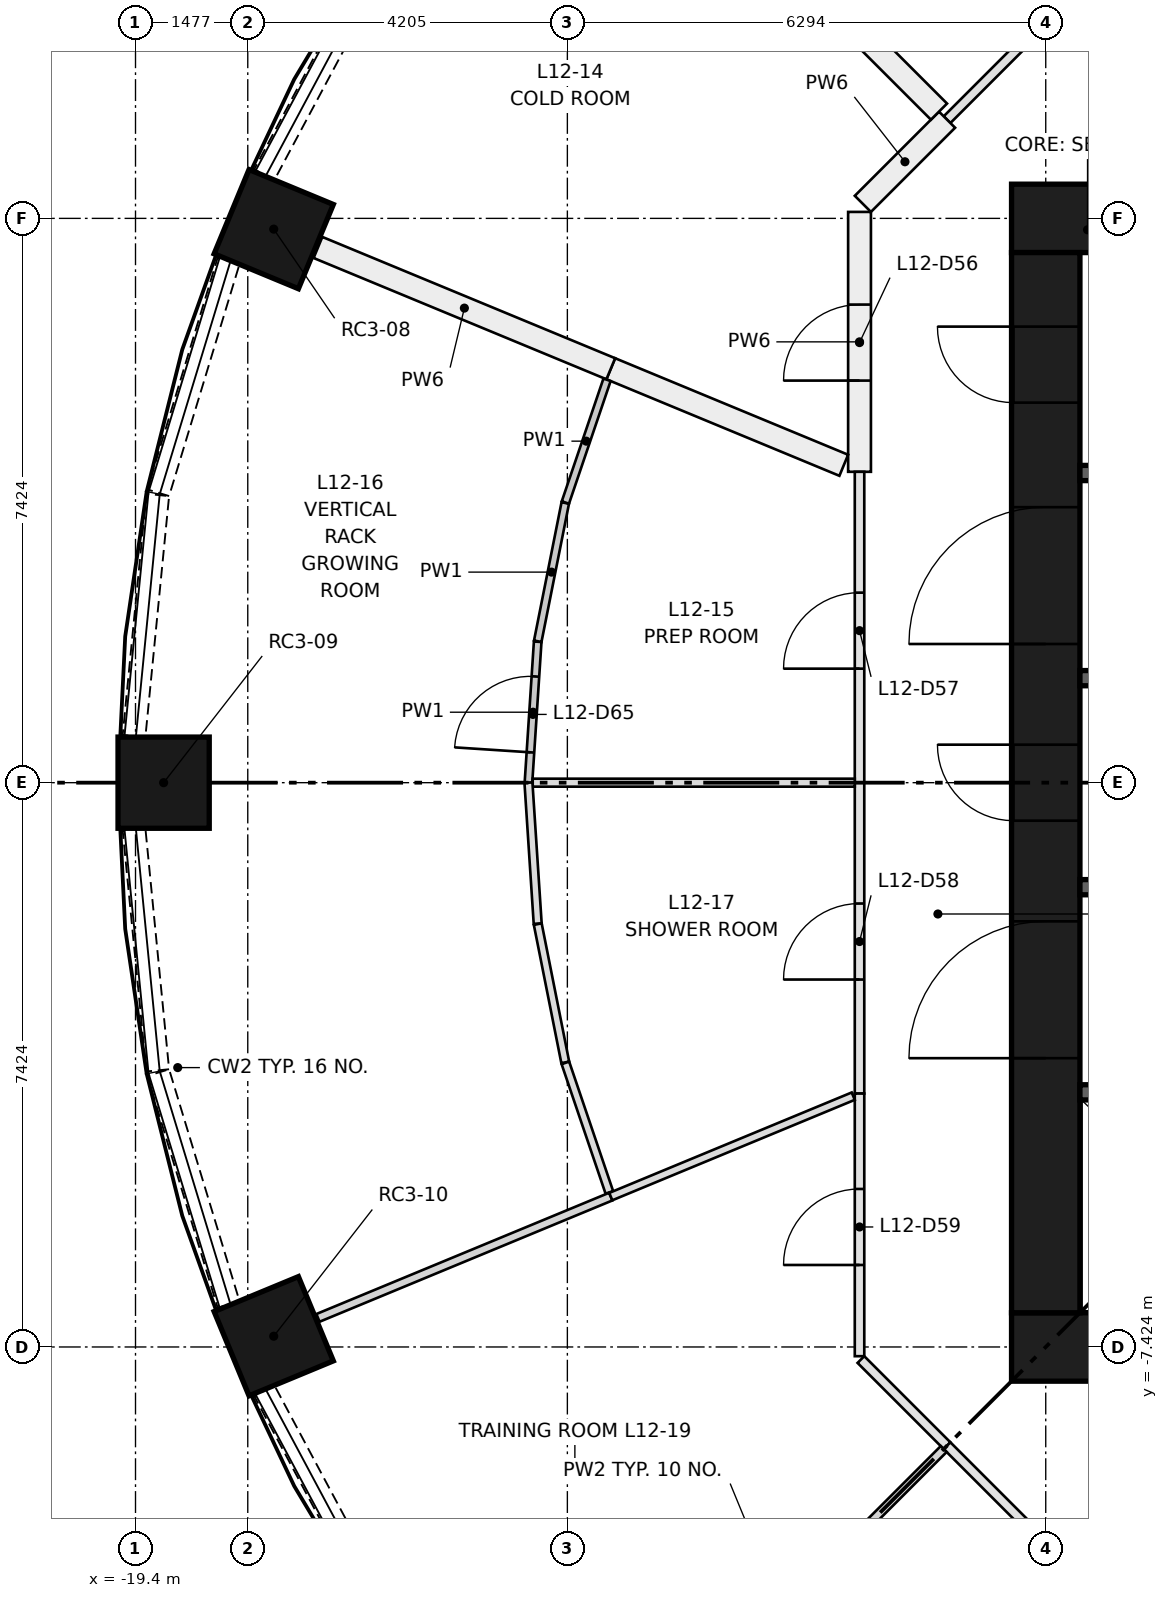
"""IFC4 building model, lengths in metres.
Left out: names, types, materials, properties, quantities, classifications, styles, units other than length and angle.
Written with IfcOpenShell. Run it as: python <this file> out.ifc"""

import sys

from ifc_helpers import new_model, si_unit, direction, frame, frame_2d, origin, origin_2d, place, context, subcontext, project, spatial, rectangle, extrude, element, fill, save


model = new_model("IFC4")
c1 = context("Model", 3, precision=1e-05, world=origin(), true_north=direction((0.0, 1.0)))
c2 = subcontext(c1, "Body", "Model", "MODEL_VIEW")
j1 = project(units=[si_unit("LENGTHUNIT", "METRE"), si_unit("PLANEANGLEUNIT", "RADIAN")], contexts=[c1])
p1 = place(None, origin())
s1 = spatial("IfcSite", under=j1, at=p1, CompositionType="ELEMENT")
p2 = place(p1, origin())
s2 = spatial("IfcBuilding", under=s1, at=p2, CompositionType="ELEMENT")
p3 = place(p2, frame((0.0, 0.0, 48.1)))
s3 = spatial("IfcBuildingStorey", under=s2, at=p3, CompositionType="ELEMENT", Elevation=48.1)
for number, where, z_axis, x_axis in (
    (1, (-17.582, 7.282, 0.0), (0.0, 0.0, 1.0), (-0.924, 0.383, 0.0)),
    (2, (-19.03, 0.0, 0.0), (0.0, 0.0, 1.0), (-1.0, 0.0, 0.0)),
    (3, (-17.582, -7.282, 0.0), (0.0, 0.0, 1.0), (-0.924, -0.383, 0.0)),
):
    element("IfcColumn", number, at=place(p3, frame(where, z_axis=z_axis, x_axis=x_axis)), inside=s3, PredefinedType="COLUMN", context=c2, shape_type="SweptSolid", body=[
        extrude(rectangle(XDim=1.2, YDim=1.2, at=origin_2d()), origin(), (0.0, 0.0, 1.0), 3.65),
    ])
for number, where, z_axis, x_axis in (
    (4, (-7.874, -7.424, 0.0), (0.0, 0.0, 1.0), (1.0, 0.0, 0.0)),
    (5, (-7.874, 7.424, 0.0), (0.0, 0.0, 1.0), (1.0, 0.0, 0.0)),
):
    element("IfcWall", number, at=place(p3, frame(where, z_axis=z_axis, x_axis=x_axis)), inside=s3, PredefinedType="SHEAR", context=c2, shape_type="SweptSolid", body=[
        extrude(rectangle(XDim=15.748, YDim=0.9, at=frame_2d((7.874, 0.0))), origin(), (0.0, 0.0, 1.0), 3.65),
    ])
p4 = place(p3, frame((-7.424, -6.974, 0.0), z_axis=(0.0, 0.0, 1.0), x_axis=(0.0, 1.0, 0.0)))
e6 = element("IfcWall", 6, at=p4, inside=s3, PredefinedType="SHEAR", context=c2, shape_type="SweptSolid", body=[
    extrude(rectangle(XDim=13.948, YDim=0.9, at=frame_2d((6.974, 0.0))), origin(), (0.0, 0.0, 1.0), 3.65),
])
p5 = place(p4, frame((6.474, 0.0, 0.0)))
e7 = element("IfcOpeningElement", 7, at=p5, cuts=e6, PredefinedType="OPENING", context=c2, shape_type="SweptSolid", body=[
    extrude(rectangle(XDim=1.0, YDim=2.1, at=frame_2d((0.5, 1.05))), frame((0.0, 0.46, 0.0), z_axis=(0.0, -1.0, 0.0), x_axis=(1.0, 0.0, 0.0)), (0.0, 0.0, 1.0), 0.92),
])
p6 = place(p4, frame((3.35, 0.0, 0.0)))
e8 = element("IfcOpeningElement", 8, at=p6, cuts=e6, PredefinedType="OPENING", context=c2, shape_type="SweptSolid", body=[
    extrude(rectangle(XDim=1.8, YDim=2.1, at=frame_2d((0.9, 1.05))), frame((0.0, 0.46, 0.0), z_axis=(0.0, -1.0, 0.0), x_axis=(1.0, 0.0, 0.0)), (0.0, 0.0, 1.0), 0.92),
])
p7 = place(p4, frame((8.799, 0.0, 0.0)))
e9 = element("IfcOpeningElement", 9, at=p7, cuts=e6, PredefinedType="OPENING", context=c2, shape_type="SweptSolid", body=[
    extrude(rectangle(XDim=1.8, YDim=2.1, at=frame_2d((0.9, 1.05))), frame((0.0, 0.46, 0.0), z_axis=(0.0, -1.0, 0.0), x_axis=(1.0, 0.0, 0.0)), (0.0, 0.0, 1.0), 0.92),
])
p8 = place(p4, frame((11.974, 0.0, 0.0)))
e10 = element("IfcOpeningElement", 10, at=p8, cuts=e6, PredefinedType="OPENING", context=c2, shape_type="SweptSolid", body=[
    extrude(rectangle(XDim=1.0, YDim=2.1, at=frame_2d((0.5, 1.05))), frame((0.0, 0.46, 0.0), z_axis=(0.0, -1.0, 0.0), x_axis=(1.0, 0.0, 0.0)), (0.0, 0.0, 1.0), 0.92),
])
p9 = place(p3, frame((-6.974, -4.074, 0.0), z_axis=(0.0, 0.0, 1.0), x_axis=(1.0, 0.0, 0.0)))
e11 = element("IfcWall", 11, at=p9, inside=s3, PredefinedType="SHEAR", context=c2, shape_type="SweptSolid", body=[
    extrude(rectangle(XDim=13.948, YDim=0.2, at=frame_2d((6.974, 0.0))), origin(), (0.0, 0.0, 1.0), 3.3),
])
p10 = place(p9, frame((0.918, 0.0, 0.0)))
e12 = element("IfcOpeningElement", 12, at=p10, cuts=e11, PredefinedType="OPENING", context=c2, shape_type="SweptSolid", body=[
    extrude(rectangle(XDim=1.1, YDim=2.1, at=frame_2d((0.55, 1.05))), frame((0.0, 0.11, 0.0), z_axis=(0.0, -1.0, 0.0), x_axis=(1.0, 0.0, 0.0)), (0.0, 0.0, 1.0), 0.22),
])
p11 = place(p9, frame((4.055, 0.0, 0.0)))
e13 = element("IfcOpeningElement", 13, at=p11, cuts=e11, PredefinedType="OPENING", context=c2, shape_type="SweptSolid", body=[
    extrude(rectangle(XDim=1.1, YDim=2.1, at=frame_2d((0.55, 1.05))), frame((0.0, 0.11, 0.0), z_axis=(0.0, -1.0, 0.0), x_axis=(1.0, 0.0, 0.0)), (0.0, 0.0, 1.0), 0.22),
])
p12 = place(p9, frame((6.658, 0.0, 0.0)))
e14 = element("IfcOpeningElement", 14, at=p12, cuts=e11, PredefinedType="OPENING", context=c2, shape_type="SweptSolid", body=[
    extrude(rectangle(XDim=1.0, YDim=2.1, at=frame_2d((0.5, 1.05))), frame((0.0, 0.11, 0.0), z_axis=(0.0, -1.0, 0.0), x_axis=(1.0, 0.0, 0.0)), (0.0, 0.0, 1.0), 0.22),
])
p13 = place(p9, frame((8.627, 0.0, 0.0)))
e15 = element("IfcOpeningElement", 15, at=p13, cuts=e11, PredefinedType="OPENING", context=c2, shape_type="SweptSolid", body=[
    extrude(rectangle(XDim=1.0, YDim=2.1, at=frame_2d((0.5, 1.05))), frame((0.0, 0.11, 0.0), z_axis=(0.0, -1.0, 0.0), x_axis=(1.0, 0.0, 0.0)), (0.0, 0.0, 1.0), 0.22),
])
p14 = place(p9, frame((10.595, 0.0, 0.0)))
e16 = element("IfcOpeningElement", 16, at=p14, cuts=e11, PredefinedType="OPENING", context=c2, shape_type="SweptSolid", body=[
    extrude(rectangle(XDim=1.0, YDim=2.1, at=frame_2d((0.5, 1.05))), frame((0.0, 0.11, 0.0), z_axis=(0.0, -1.0, 0.0), x_axis=(1.0, 0.0, 0.0)), (0.0, 0.0, 1.0), 0.22),
])
p15 = place(p9, frame((12.564, 0.0, 0.0)))
e17 = element("IfcOpeningElement", 17, at=p15, cuts=e11, PredefinedType="OPENING", context=c2, shape_type="SweptSolid", body=[
    extrude(rectangle(XDim=1.0, YDim=2.1, at=frame_2d((0.5, 1.05))), frame((0.0, 0.11, 0.0), z_axis=(0.0, -1.0, 0.0), x_axis=(1.0, 0.0, 0.0)), (0.0, 0.0, 1.0), 0.22),
])
p16 = place(p3, frame((-6.974, 4.074, 0.0), z_axis=(0.0, 0.0, 1.0), x_axis=(1.0, 0.0, 0.0)))
e18 = element("IfcWall", 18, at=p16, inside=s3, PredefinedType="SHEAR", context=c2, shape_type="SweptSolid", body=[
    extrude(rectangle(XDim=6.974, YDim=0.2, at=frame_2d((3.487, 0.0))), origin(), (0.0, 0.0, 1.0), 3.3),
])
for number, where, z_axis, x_axis in (
    (19, (-6.974, -1.375, 0.0), (0.0, 0.0, 1.0), (1.0, 0.0, 0.0)),
    (20, (-6.974, 1.375, 0.0), (0.0, 0.0, 1.0), (1.0, 0.0, 0.0)),
):
    element("IfcWall", number, at=place(p3, frame(where, z_axis=z_axis, x_axis=x_axis)), inside=s3, PredefinedType="SHEAR", context=c2, shape_type="SweptSolid", body=[
        extrude(rectangle(XDim=2.6, YDim=0.2, at=frame_2d((1.3, 0.0))), origin(), (0.0, 0.0, 1.0), 3.3),
    ])
p17 = place(p3, frame((-16.204, 10.809, 0.0), z_axis=(0.0, 0.0, 1.0), x_axis=(-0.471260138764, -0.881994263934, 0.0)))
e21 = element("IfcWall", 21, at=p17, inside=s3, PredefinedType="SOLIDWALL", context=c2, shape_type="SweptSolid", body=[
    extrude(rectangle(XDim=3.187, YDim=0.3, at=frame_2d((1.593, 0.0))), origin(), (0.0, 0.0, 1.0), 0.9),
])
p18 = place(p3, frame((-18.175, 6.865, 0.0), z_axis=(0.0, 0.0, 1.0), x_axis=(-0.290585541792, -0.956849017819, 0.0)))
e22 = element("IfcWall", 22, at=p18, inside=s3, PredefinedType="SOLIDWALL", context=c2, shape_type="SweptSolid", body=[
    extrude(rectangle(XDim=3.188, YDim=0.3, at=frame_2d((1.594, 0.0))), origin(), (0.0, 0.0, 1.0), 0.9),
])
for number, where, z_axis, x_axis in (
    (23, (-19.107, 3.785, 0.0), (0.0, 0.0, 1.0), (-0.098, -0.995, 0.0)),
    (24, (-19.419, -0.613, 0.0), (0.0, 0.0, 1.0), (0.098, -0.995, 0.0)),
):
    element("IfcWall", number, at=place(p3, frame(where, z_axis=z_axis, x_axis=x_axis)), inside=s3, PredefinedType="SOLIDWALL", context=c2, shape_type="SweptSolid", body=[
        extrude(rectangle(XDim=3.188, YDim=0.3, at=frame_2d((1.594, 0.0))), origin(), (0.0, 0.0, 1.0), 0.9),
    ])
p19 = place(p3, frame((-19.102, -3.814, 0.0), z_axis=(0.0, 0.0, 1.0), x_axis=(0.290585541792, -0.956849017819, 0.0)))
e25 = element("IfcWall", 25, at=p19, inside=s3, PredefinedType="SOLIDWALL", context=c2, shape_type="SweptSolid", body=[
    extrude(rectangle(XDim=3.188, YDim=0.3, at=frame_2d((1.594, 0.0))), origin(), (0.0, 0.0, 1.0), 0.9),
])
p20 = place(p3, frame((-17.706, -7.998, 0.0), z_axis=(0.0, 0.0, 1.0), x_axis=(0.471260138764, -0.881994263934, 0.0)))
e26 = element("IfcWall", 26, at=p20, inside=s3, PredefinedType="SOLIDWALL", context=c2, shape_type="SweptSolid", body=[
    extrude(rectangle(XDim=3.187, YDim=0.3, at=frame_2d((1.593, 0.0))), origin(), (0.0, 0.0, 1.0), 0.9),
])
p21 = place(p3, frame((-8.722, 8.722, 0.0), z_axis=(0.0, 0.0, 1.0), x_axis=(0.707030604857, 0.70718294931, 0.0)))
e27 = element("IfcWall", 27, at=p21, inside=s3, PredefinedType="PARTITIONING", context=c2, shape_type="SweptSolid", body=[
    extrude(rectangle(XDim=1.603, YDim=0.125, at=frame_2d((0.801, 0.0))), origin(), (0.0, 0.0, 1.0), 3.3),
])
p22 = place(p3, frame((-9.874, 4.09, 0.0), z_axis=(0.0, 0.0, 1.0), x_axis=(0.0, 1.0, 0.0)))
e28 = element("IfcWall", 28, at=p22, inside=s3, PredefinedType="PARTITIONING", context=c2, shape_type="SweptSolid", body=[
    extrude(rectangle(XDim=3.419, YDim=0.3, at=frame_2d((1.709, 0.0))), origin(), (0.0, 0.0, 1.0), 3.3),
])
p23 = place(p22, frame((1.2, 0.0, 0.0)))
e29 = element("IfcOpeningElement", 29, at=p23, cuts=e28, PredefinedType="OPENING", context=c2, shape_type="SweptSolid", body=[
    extrude(rectangle(XDim=1.0, YDim=2.1, at=frame_2d((0.5, 1.05))), frame((0.0, 0.16, 0.0), z_axis=(0.0, -1.0, 0.0), x_axis=(1.0, 0.0, 0.0)), (0.0, 0.0, 1.0), 0.32),
])
p24 = place(p3, frame((-9.83, 7.615, 0.0), z_axis=(0.0, 0.0, 1.0), x_axis=(0.70718471217, 0.707028841614, 0.0)))
e30 = element("IfcWall", 30, at=p24, inside=s3, PredefinedType="PARTITIONING", context=c2, shape_type="SweptSolid", body=[
    extrude(rectangle(XDim=1.566, YDim=0.3, at=frame_2d((0.783, 0.0))), origin(), (0.0, 0.0, 1.0), 3.3),
])
p25 = place(p3, frame((-9.874, 0.0, 0.0), z_axis=(0.0, 0.0, 1.0), x_axis=(0.0, 1.0, 0.0)))
e31 = element("IfcWall", 31, at=p25, inside=s3, PredefinedType="PARTITIONING", context=c2, shape_type="SweptSolid", body=[
    extrude(rectangle(XDim=4.09, YDim=0.125, at=frame_2d((2.045, 0.0))), origin(), (0.0, 0.0, 1.0), 3.3),
])
p26 = place(p25, frame((1.5, 0.0, 0.0)))
e32 = element("IfcOpeningElement", 32, at=p26, cuts=e31, PredefinedType="OPENING", context=c2, shape_type="SweptSolid", body=[
    extrude(rectangle(XDim=1.0, YDim=2.1, at=frame_2d((0.5, 1.05))), frame((0.0, 0.073, 0.0), z_axis=(0.0, -1.0, 0.0), x_axis=(1.0, 0.0, 0.0)), (0.0, 0.0, 1.0), 0.145),
])
p27 = place(p3, frame((-9.874, -4.09, 0.0), z_axis=(0.0, 0.0, 1.0), x_axis=(0.0, 1.0, 0.0)))
e33 = element("IfcWall", 33, at=p27, inside=s3, PredefinedType="PARTITIONING", context=c2, shape_type="SweptSolid", body=[
    extrude(rectangle(XDim=4.09, YDim=0.125, at=frame_2d((2.045, 0.0))), origin(), (0.0, 0.0, 1.0), 3.3),
])
p28 = place(p27, frame((1.5, 0.0, 0.0)))
e34 = element("IfcOpeningElement", 34, at=p28, cuts=e33, PredefinedType="OPENING", context=c2, shape_type="SweptSolid", body=[
    extrude(rectangle(XDim=1.0, YDim=2.1, at=frame_2d((0.5, 1.05))), frame((0.0, 0.073, 0.0), z_axis=(0.0, -1.0, 0.0), x_axis=(1.0, 0.0, 0.0)), (0.0, 0.0, 1.0), 0.145),
])
p29 = place(p3, frame((-9.874, -7.545, 0.0), z_axis=(0.0, 0.0, 1.0), x_axis=(0.0, 1.0, 0.0)))
e35 = element("IfcWall", 35, at=p29, inside=s3, PredefinedType="PARTITIONING", context=c2, shape_type="SweptSolid", body=[
    extrude(rectangle(XDim=3.455, YDim=0.125, at=frame_2d((1.728, 0.0))), origin(), (0.0, 0.0, 1.0), 3.3),
])
p30 = place(p29, frame((1.2, 0.0, 0.0)))
e36 = element("IfcOpeningElement", 36, at=p30, cuts=e35, PredefinedType="OPENING", context=c2, shape_type="SweptSolid", body=[
    extrude(rectangle(XDim=1.0, YDim=2.1, at=frame_2d((0.5, 1.05))), frame((0.0, 0.073, 0.0), z_axis=(0.0, -1.0, 0.0), x_axis=(1.0, 0.0, 0.0)), (0.0, 0.0, 1.0), 0.145),
])
for number, where, z_axis, x_axis in (
    (37, (-8.722, -8.722, 0.0), (0.0, 0.0, 1.0), (-0.707, 0.707, 0.0)),
    (38, (-7.589, -9.856, 0.0), (0.0, 0.0, 1.0), (-0.707, 0.707, 0.0)),
):
    element("IfcWall", number, at=place(p3, frame(where, z_axis=z_axis, x_axis=x_axis)), inside=s3, PredefinedType="PARTITIONING", context=c2, shape_type="SweptSolid", body=[
        extrude(rectangle(XDim=1.603, YDim=0.125, at=frame_2d((0.801, 0.0))), origin(), (0.0, 0.0, 1.0), 3.3),
    ])
p31 = place(p3, frame((-8.829, 8.829, 0.0), z_axis=(0.0, 0.0, 1.0), x_axis=(-0.707106781187, 0.707106781187, 0.0)))
e39 = element("IfcWall", 39, at=p31, inside=s3, PredefinedType="PARTITIONING", context=c2, shape_type="SweptSolid", body=[
    extrude(rectangle(XDim=5.914, YDim=0.3, at=frame_2d((2.957, 0.0))), origin(), (0.0, 0.0, 1.0), 3.3),
])
p32 = place(p3, frame((-10.081, 4.176, 0.0), z_axis=(0.0, 0.0, 1.0), x_axis=(-0.923876033225, 0.382691880281, 0.0)))
e40 = element("IfcWall", 40, at=p32, inside=s3, PredefinedType="PARTITIONING", context=c2, shape_type="SweptSolid", body=[
    extrude(rectangle(XDim=3.318, YDim=0.3, at=frame_2d((1.659, 0.0))), origin(), (0.0, 0.0, 1.0), 3.3),
])
p33 = place(p3, frame((-13.147, 5.446, 0.0), z_axis=(0.0, 0.0, 1.0), x_axis=(-0.923873410436, 0.382698212028, 0.0)))
e41 = element("IfcWall", 41, at=p33, inside=s3, PredefinedType="PARTITIONING", context=c2, shape_type="SweptSolid", body=[
    extrude(rectangle(XDim=4.17, YDim=0.3, at=frame_2d((2.085, 0.0))), origin(), (0.0, 0.0, 1.0), 3.3),
])
p34 = place(p3, frame((-14.23, 0.0, 0.0), z_axis=(0.0, 0.0, 1.0), x_axis=(0.065437532333, 0.997856667745, 0.0)))
e42 = element("IfcWall", 42, at=p34, inside=s3, PredefinedType="PARTITIONING", context=c2, shape_type="SweptSolid", body=[
    extrude(rectangle(XDim=1.858, YDim=0.1, at=frame_2d((0.929, 0.0))), origin(), (0.0, 0.0, 1.0), 3.3),
])
p35 = place(p34, frame((0.4, 0.0, 0.0)))
e43 = element("IfcOpeningElement", 43, at=p35, cuts=e42, PredefinedType="OPENING", context=c2, shape_type="SweptSolid", body=[
    extrude(rectangle(XDim=1.0, YDim=2.1, at=frame_2d((0.5, 1.05))), frame((0.0, 0.06, 0.0), z_axis=(0.0, -1.0, 0.0), x_axis=(1.0, 0.0, 0.0)), (0.0, 0.0, 1.0), 0.12),
])
p36 = place(p3, frame((-14.108, 1.861, 0.0), z_axis=(0.0, 0.0, 1.0), x_axis=(0.195204777565, 0.980762506836, 0.0)))
e44 = element("IfcWall", 44, at=p36, inside=s3, PredefinedType="PARTITIONING", context=c2, shape_type="SweptSolid", body=[
    extrude(rectangle(XDim=1.855, YDim=0.1, at=frame_2d((0.927, 0.0))), origin(), (0.0, 0.0, 1.0), 3.3),
])
p37 = place(p3, frame((-13.744, 3.686, 0.0), z_axis=(0.0, 0.0, 1.0), x_axis=(0.321250473512, 0.946994262532, 0.0)))
e45 = element("IfcWall", 45, at=p37, inside=s3, PredefinedType="PARTITIONING", context=c2, shape_type="SweptSolid", body=[
    extrude(rectangle(XDim=1.705, YDim=0.1, at=frame_2d((0.852, 0.0))), origin(), (0.0, 0.0, 1.0), 3.3),
])
p38 = place(p3, frame((-9.937, 0.0, 0.0), z_axis=(0.0, 0.0, 1.0), x_axis=(-1.0, 0.0, 0.0)))
e46 = element("IfcWall", 46, at=p38, inside=s3, PredefinedType="PARTITIONING", context=c2, shape_type="SweptSolid", body=[
    extrude(rectangle(XDim=4.237, YDim=0.105, at=frame_2d((2.119, 0.0))), origin(), (0.0, 0.0, 1.0), 3.3),
])
p39 = place(p3, frame((-14.23, 0.0, 0.0), z_axis=(0.0, 0.0, 1.0), x_axis=(0.065437532333, -0.997856667745, 0.0)))
e47 = element("IfcWall", 47, at=p39, inside=s3, PredefinedType="PARTITIONING", context=c2, shape_type="SweptSolid", body=[
    extrude(rectangle(XDim=1.858, YDim=0.105, at=frame_2d((0.929, 0.0))), origin(), (0.0, 0.0, 1.0), 3.3),
])
p40 = place(p3, frame((-14.108, -1.861, 0.0), z_axis=(0.0, 0.0, 1.0), x_axis=(0.195103348377, -0.980782689209, 0.0)))
e48 = element("IfcWall", 48, at=p40, inside=s3, PredefinedType="PARTITIONING", context=c2, shape_type="SweptSolid", body=[
    extrude(rectangle(XDim=1.854, YDim=0.105, at=frame_2d((0.927, 0.0))), origin(), (0.0, 0.0, 1.0), 3.3),
])
p41 = place(p3, frame((-13.744, -3.686, 0.0), z_axis=(0.0, 0.0, 1.0), x_axis=(0.321433227273, -0.946932246998, 0.0)))
e49 = element("IfcWall", 49, at=p41, inside=s3, PredefinedType="PARTITIONING", context=c2, shape_type="SweptSolid", body=[
    extrude(rectangle(XDim=1.799, YDim=0.105, at=frame_2d((0.9, 0.0))), origin(), (0.0, 0.0, 1.0), 3.3),
])
p42 = place(p3, frame((-13.147, -5.446, 0.0), z_axis=(0.0, 0.0, 1.0), x_axis=(-0.923873410436, -0.382698212028, 0.0)))
e50 = element("IfcWall", 50, at=p42, inside=s3, PredefinedType="PARTITIONING", context=c2, shape_type="SweptSolid", body=[
    extrude(rectangle(XDim=4.17, YDim=0.11, at=frame_2d((2.085, 0.0))), origin(), (0.0, 0.0, 1.0), 3.3),
])
p43 = place(p3, frame((-9.957, -4.124, 0.0), z_axis=(0.0, 0.0, 1.0), x_axis=(-0.923867748948, -0.382711879165, 0.0)))
e51 = element("IfcWall", 51, at=p43, inside=s3, PredefinedType="PARTITIONING", context=c2, shape_type="SweptSolid", body=[
    extrude(rectangle(XDim=3.453, YDim=0.105, at=frame_2d((1.727, 0.0))), origin(), (0.0, 0.0, 1.0), 3.3),
])
p44 = place(p3, frame((-13.011, -13.011, 0.0), z_axis=(0.0, 0.0, 1.0), x_axis=(0.707106781187, 0.707106781187, 0.0)))
e52 = element("IfcWall", 52, at=p44, inside=s3, PredefinedType="PARTITIONING", context=c2, shape_type="SweptSolid", body=[
    extrude(rectangle(XDim=6.002, YDim=0.11, at=frame_2d((3.001, 0.0))), origin(), (0.0, 0.0, 1.0), 3.3),
])
p45 = place(p5, origin())
e53 = element("IfcDoor", 53, at=p45, inside=s3, OperationType="SINGLE_SWING_RIGHT", PredefinedType="DOOR", context=c2, shape_type="SweptSolid", body=[
    extrude(rectangle(XDim=1.0, YDim=2.1, at=frame_2d((0.5, 1.05))), frame((0.0, 0.45, 0.0), z_axis=(0.0, -1.0, 0.0), x_axis=(1.0, 0.0, 0.0)), (0.0, 0.0, 1.0), 0.05),
])
fill(e7, e53)
p46 = place(p6, origin())
e54 = element("IfcDoor", 54, at=p46, inside=s3, OperationType="DOUBLE_DOOR_SINGLE_SWING", PredefinedType="DOOR", context=c2, shape_type="SweptSolid", body=[
    extrude(rectangle(XDim=1.8, YDim=2.1, at=frame_2d((0.9, 1.05))), frame((0.0, 0.025, 0.0), z_axis=(0.0, -1.0, 0.0), x_axis=(1.0, 0.0, 0.0)), (0.0, 0.0, 1.0), 0.05),
])
fill(e8, e54)
p47 = place(p7, origin())
e55 = element("IfcDoor", 55, at=p47, inside=s3, OperationType="DOUBLE_DOOR_SINGLE_SWING", PredefinedType="DOOR", context=c2, shape_type="SweptSolid", body=[
    extrude(rectangle(XDim=1.8, YDim=2.1, at=frame_2d((0.9, 1.05))), frame((0.0, 0.025, 0.0), z_axis=(0.0, -1.0, 0.0), x_axis=(1.0, 0.0, 0.0)), (0.0, 0.0, 1.0), 0.05),
])
fill(e9, e55)
p48 = place(p8, origin())
e56 = element("IfcDoor", 56, at=p48, inside=s3, OperationType="SINGLE_SWING_RIGHT", PredefinedType="DOOR", context=c2, shape_type="SweptSolid", body=[
    extrude(rectangle(XDim=1.0, YDim=2.1, at=frame_2d((0.5, 1.05))), frame((0.0, 0.45, 0.0), z_axis=(0.0, -1.0, 0.0), x_axis=(1.0, 0.0, 0.0)), (0.0, 0.0, 1.0), 0.05),
])
fill(e10, e56)
p49 = place(p23, origin())
e57 = element("IfcDoor", 57, at=p49, inside=s3, OperationType="SINGLE_SWING_LEFT", PredefinedType="DOOR", context=c2, shape_type="SweptSolid", body=[
    extrude(rectangle(XDim=1.0, YDim=2.1, at=frame_2d((0.5, 1.05))), frame((0.0, 0.025, 0.0), z_axis=(0.0, -1.0, 0.0), x_axis=(1.0, 0.0, 0.0)), (0.0, 0.0, 1.0), 0.05),
])
fill(e29, e57)
p50 = place(p26, origin())
e58 = element("IfcDoor", 58, at=p50, inside=s3, OperationType="SINGLE_SWING_LEFT", PredefinedType="DOOR", context=c2, shape_type="SweptSolid", body=[
    extrude(rectangle(XDim=1.0, YDim=2.1, at=frame_2d((0.5, 1.05))), frame((0.0, 0.025, 0.0), z_axis=(0.0, -1.0, 0.0), x_axis=(1.0, 0.0, 0.0)), (0.0, 0.0, 1.0), 0.05),
])
fill(e32, e58)
p51 = place(p28, origin())
e59 = element("IfcDoor", 59, at=p51, inside=s3, OperationType="SINGLE_SWING_LEFT", PredefinedType="DOOR", context=c2, shape_type="SweptSolid", body=[
    extrude(rectangle(XDim=1.0, YDim=2.1, at=frame_2d((0.5, 1.05))), frame((0.0, 0.025, 0.0), z_axis=(0.0, -1.0, 0.0), x_axis=(1.0, 0.0, 0.0)), (0.0, 0.0, 1.0), 0.05),
])
fill(e34, e59)
p52 = place(p30, origin())
e60 = element("IfcDoor", 60, at=p52, inside=s3, OperationType="SINGLE_SWING_LEFT", PredefinedType="DOOR", context=c2, shape_type="SweptSolid", body=[
    extrude(rectangle(XDim=1.0, YDim=2.1, at=frame_2d((0.5, 1.05))), frame((0.0, 0.025, 0.0), z_axis=(0.0, -1.0, 0.0), x_axis=(1.0, 0.0, 0.0)), (0.0, 0.0, 1.0), 0.05),
])
fill(e36, e60)
p53 = place(p35, origin())
e61 = element("IfcDoor", 61, at=p53, inside=s3, OperationType="SINGLE_SWING_LEFT", PredefinedType="DOOR", context=c2, shape_type="SweptSolid", body=[
    extrude(rectangle(XDim=1.0, YDim=2.1, at=frame_2d((0.5, 1.05))), frame((0.0, 0.025, 0.0), z_axis=(0.0, -1.0, 0.0), x_axis=(1.0, 0.0, 0.0)), (0.0, 0.0, 1.0), 0.05),
])
fill(e43, e61)
save(model, sys.argv[1])
